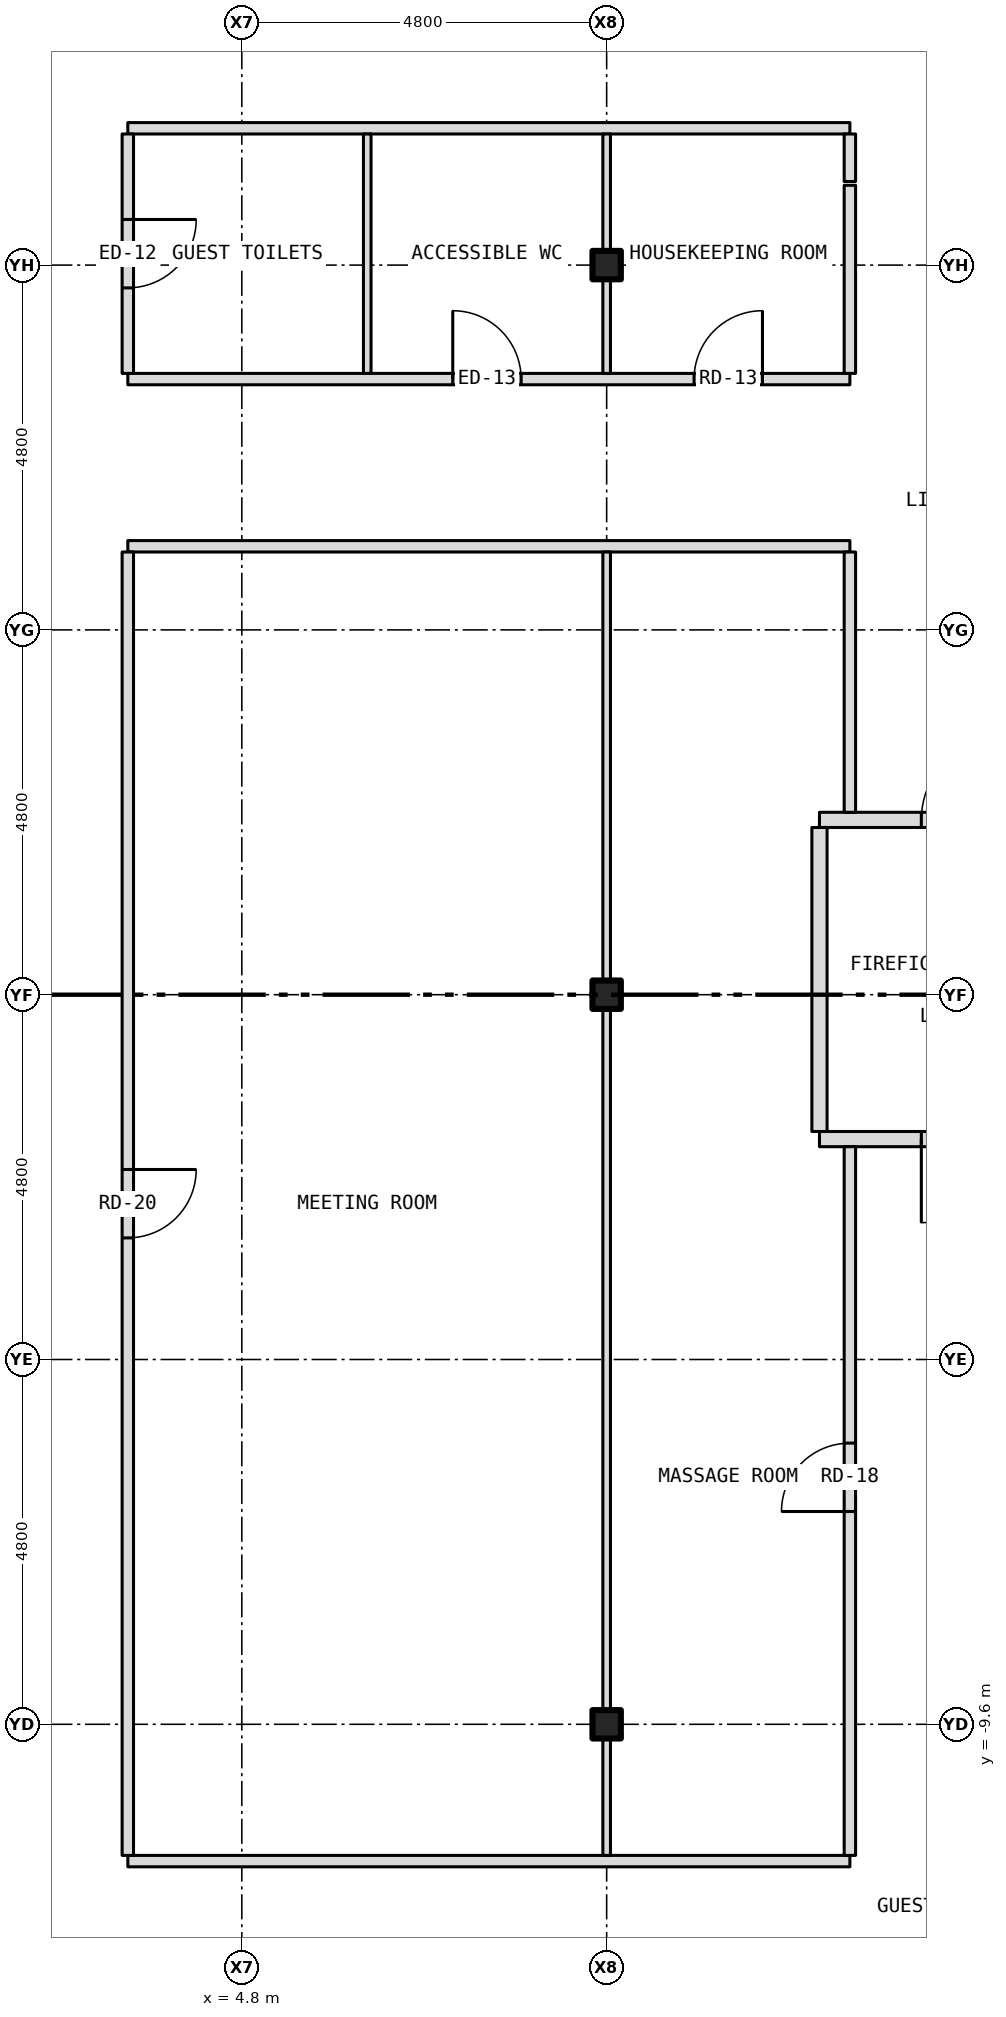
"""IFC4 building model, lengths in metres.
Left out: names, types, materials, properties, quantities, classifications, styles, units other than length and angle.
Written with IfcOpenShell. Run it as: python <this file> out.ifc"""

import sys

from ifc_helpers import new_model, si_unit, direction, frame, frame_2d, origin, origin_2d, place, context, subcontext, project, spatial, rectangle, i_section, extrude, element, fill, save


model = new_model("IFC4")
c1 = context("Model", 3, precision=1e-05, world=origin(), true_north=direction((0.0, 1.0)))
c2 = subcontext(c1, "Body", "Model", "MODEL_VIEW")
j1 = project(units=[si_unit("LENGTHUNIT", "METRE"), si_unit("PLANEANGLEUNIT", "RADIAN")], contexts=[c1])
p1 = place(None, origin())
s1 = spatial("IfcSite", under=j1, at=p1, CompositionType="ELEMENT")
p2 = place(p1, origin())
s2 = spatial("IfcBuilding", under=s1, at=p2, CompositionType="ELEMENT")
p3 = place(p2, frame((0.0, 0.0, 165.5)))
s3 = spatial("IfcBuildingStorey", under=s2, at=p3, CompositionType="ELEMENT", Elevation=165.5)
for number, where, z_axis, x_axis in (
    (1, (9.6, -9.6, -0.15), (0.0, 0.0, 1.0), (1.0, 0.0, 0.0)),
    (2, (9.6, 0.0, -0.15), (0.0, 0.0, 1.0), (1.0, 0.0, 0.0)),
    (3, (9.6, 9.6, -0.15), (0.0, 0.0, 1.0), (1.0, 0.0, 0.0)),
):
    element("IfcColumn", number, at=place(p3, frame(where, z_axis=z_axis, x_axis=x_axis)), inside=s3, PredefinedType="COLUMN", context=c2, shape_type="SweptSolid", body=[
        extrude(i_section(OverallWidth=0.373, OverallDepth=0.373, WebThickness=0.016, FlangeThickness=0.026, at=origin_2d()), origin(), (0.0, 0.0, 1.0), 3.5),
    ])
p4 = place(p3, frame((3.3, -11.4, 0.0), z_axis=(0.0, 0.0, 1.0), x_axis=(1.0, 0.0, 0.0)))
e4 = element("IfcWall", 4, at=p4, inside=s3, PredefinedType="PARTITIONING", context=c2, shape_type="SweptSolid", body=[
    extrude(rectangle(XDim=9.5, YDim=0.15, at=frame_2d((4.75, 0.0))), origin(), (0.0, 0.0, 1.0), 3.35),
])
p5 = place(p3, frame((12.4, -1.9, 0.0), z_axis=(0.0, 0.0, 1.0), x_axis=(1.0, 0.0, 0.0)))
e5 = element("IfcWall", 5, at=p5, inside=s3, PredefinedType="PARTITIONING", context=c2, shape_type="SweptSolid", body=[
    extrude(rectangle(XDim=3.28, YDim=0.2, at=frame_2d((1.64, 0.0))), origin(), (0.0, 0.0, 1.0), 3.35),
])
p6 = place(p5, frame((1.34, 0.0, 0.0)))
e6 = element("IfcOpeningElement", 6, at=p6, cuts=e5, PredefinedType="OPENING", context=c2, shape_type="SweptSolid", body=[
    extrude(rectangle(XDim=1.1, YDim=2.1, at=frame_2d((0.55, 1.05))), frame((0.0, 0.112, 0.0), z_axis=(0.0, -1.0, 0.0), x_axis=(1.0, 0.0, 0.0)), (0.0, 0.0, 1.0), 0.224),
])
p7 = place(p3, frame((12.4, 2.3, 0.0), z_axis=(0.0, 0.0, 1.0), x_axis=(1.0, 0.0, 0.0)))
e7 = element("IfcWall", 7, at=p7, inside=s3, PredefinedType="PARTITIONING", context=c2, shape_type="SweptSolid", body=[
    extrude(rectangle(XDim=3.28, YDim=0.2, at=frame_2d((1.64, 0.0))), origin(), (0.0, 0.0, 1.0), 3.35),
])
p8 = place(p7, frame((1.34, 0.0, 0.0)))
e8 = element("IfcOpeningElement", 8, at=p8, cuts=e7, PredefinedType="OPENING", context=c2, shape_type="SweptSolid", body=[
    extrude(rectangle(XDim=1.1, YDim=2.1, at=frame_2d((0.55, 1.05))), frame((0.0, 0.112, 0.0), z_axis=(0.0, -1.0, 0.0), x_axis=(1.0, 0.0, 0.0)), (0.0, 0.0, 1.0), 0.224),
])
p9 = place(p3, frame((3.3, 5.9, 0.0), z_axis=(0.0, 0.0, 1.0), x_axis=(1.0, 0.0, 0.0)))
e9 = element("IfcWall", 9, at=p9, inside=s3, PredefinedType="PARTITIONING", context=c2, shape_type="SweptSolid", body=[
    extrude(rectangle(XDim=9.5, YDim=0.15, at=frame_2d((4.75, 0.0))), origin(), (0.0, 0.0, 1.0), 3.35),
])
p10 = place(p3, frame((3.3, 8.1, 0.0), z_axis=(0.0, 0.0, 1.0), x_axis=(1.0, 0.0, 0.0)))
e10 = element("IfcWall", 10, at=p10, inside=s3, PredefinedType="PARTITIONING", context=c2, shape_type="SweptSolid", body=[
    extrude(rectangle(XDim=9.5, YDim=0.15, at=frame_2d((4.75, 0.0))), origin(), (0.0, 0.0, 1.0), 3.35),
])
p11 = place(p10, frame((7.45, 0.0, 0.0)))
e11 = element("IfcOpeningElement", 11, at=p11, cuts=e10, PredefinedType="OPENING", context=c2, shape_type="SweptSolid", body=[
    extrude(rectangle(XDim=0.9, YDim=2.1, at=frame_2d((0.45, 1.05))), frame((0.0, 0.087, 0.0), z_axis=(0.0, -1.0, 0.0), x_axis=(1.0, 0.0, 0.0)), (0.0, 0.0, 1.0), 0.174),
])
p12 = place(p10, frame((4.275, 0.0, 0.0)))
e12 = element("IfcOpeningElement", 12, at=p12, cuts=e10, PredefinedType="OPENING", context=c2, shape_type="SweptSolid", body=[
    extrude(rectangle(XDim=0.9, YDim=2.1, at=frame_2d((0.45, 1.05))), frame((0.0, 0.087, 0.0), z_axis=(0.0, -1.0, 0.0), x_axis=(1.0, 0.0, 0.0)), (0.0, 0.0, 1.0), 0.174),
])
p13 = place(p3, frame((3.3, 11.4, 0.0), z_axis=(0.0, 0.0, 1.0), x_axis=(1.0, 0.0, 0.0)))
e13 = element("IfcWall", 13, at=p13, inside=s3, PredefinedType="PARTITIONING", context=c2, shape_type="SweptSolid", body=[
    extrude(rectangle(XDim=9.5, YDim=0.15, at=frame_2d((4.75, 0.0))), origin(), (0.0, 0.0, 1.0), 3.35),
])
p14 = place(p3, frame((3.3, -11.325, 0.0), z_axis=(0.0, 0.0, 1.0), x_axis=(0.0, 1.0, 0.0)))
e14 = element("IfcWall", 14, at=p14, inside=s3, PredefinedType="PARTITIONING", context=c2, shape_type="SweptSolid", body=[
    extrude(rectangle(XDim=17.15, YDim=0.15, at=frame_2d((8.575, 0.0))), origin(), (0.0, 0.0, 1.0), 3.35),
])
p15 = place(p14, frame((8.125, 0.0, 0.0)))
e15 = element("IfcOpeningElement", 15, at=p15, cuts=e14, PredefinedType="OPENING", context=c2, shape_type="SweptSolid", body=[
    extrude(rectangle(XDim=0.9, YDim=2.1, at=frame_2d((0.45, 1.05))), frame((0.0, 0.087, 0.0), z_axis=(0.0, -1.0, 0.0), x_axis=(1.0, 0.0, 0.0)), (0.0, 0.0, 1.0), 0.174),
])
p16 = place(p3, frame((3.3, 8.175, 0.0), z_axis=(0.0, 0.0, 1.0), x_axis=(0.0, 1.0, 0.0)))
e16 = element("IfcWall", 16, at=p16, inside=s3, PredefinedType="PARTITIONING", context=c2, shape_type="SweptSolid", body=[
    extrude(rectangle(XDim=3.15, YDim=0.15, at=frame_2d((1.575, 0.0))), origin(), (0.0, 0.0, 1.0), 3.35),
])
p17 = place(p16, frame((1.125, 0.0, 0.0)))
e17 = element("IfcOpeningElement", 17, at=p17, cuts=e16, PredefinedType="OPENING", context=c2, shape_type="SweptSolid", body=[
    extrude(rectangle(XDim=0.9, YDim=2.1, at=frame_2d((0.45, 1.05))), frame((0.0, 0.087, 0.0), z_axis=(0.0, -1.0, 0.0), x_axis=(1.0, 0.0, 0.0)), (0.0, 0.0, 1.0), 0.174),
])
p18 = place(p3, frame((6.45, 8.175, 0.0), z_axis=(0.0, 0.0, 1.0), x_axis=(0.0, 1.0, 0.0)))
e18 = element("IfcWall", 18, at=p18, inside=s3, PredefinedType="PARTITIONING", context=c2, shape_type="SweptSolid", body=[
    extrude(rectangle(XDim=3.15, YDim=0.1, at=frame_2d((1.575, 0.0))), origin(), (0.0, 0.0, 1.0), 3.35),
])
p19 = place(p3, frame((9.6, -11.325, 0.0), z_axis=(0.0, 0.0, 1.0), x_axis=(0.0, 1.0, 0.0)))
e19 = element("IfcWall", 19, at=p19, inside=s3, PredefinedType="PARTITIONING", context=c2, shape_type="SweptSolid", body=[
    extrude(rectangle(XDim=1.538, YDim=0.1, at=frame_2d((0.769, 0.0))), origin(), (0.0, 0.0, 1.0), 2.728),
])
p20 = place(p3, frame((9.6, -9.787, 0.0), z_axis=(0.0, 0.0, 1.0), x_axis=(0.0, 1.0, 0.0)))
e20 = element("IfcWall", 20, at=p20, inside=s3, PredefinedType="PARTITIONING", context=c2, shape_type="SweptSolid", body=[
    extrude(rectangle(XDim=0.374, YDim=0.1, at=frame_2d((0.187, 0.0))), origin(), (0.0, 0.0, 1.0), 3.35),
])
p21 = place(p3, frame((9.6, -9.413, 0.0), z_axis=(0.0, 0.0, 1.0), x_axis=(0.0, 1.0, 0.0)))
e21 = element("IfcWall", 21, at=p21, inside=s3, PredefinedType="PARTITIONING", context=c2, shape_type="SweptSolid", body=[
    extrude(rectangle(XDim=9.226, YDim=0.1, at=frame_2d((4.613, 0.0))), origin(), (0.0, 0.0, 1.0), 2.728),
])
p22 = place(p3, frame((9.6, -0.187, 0.0), z_axis=(0.0, 0.0, 1.0), x_axis=(0.0, 1.0, 0.0)))
e22 = element("IfcWall", 22, at=p22, inside=s3, PredefinedType="PARTITIONING", context=c2, shape_type="SweptSolid", body=[
    extrude(rectangle(XDim=0.374, YDim=0.1, at=frame_2d((0.187, 0.0))), origin(), (0.0, 0.0, 1.0), 3.35),
])
p23 = place(p3, frame((9.6, 0.187, 0.0), z_axis=(0.0, 0.0, 1.0), x_axis=(0.0, 1.0, 0.0)))
e23 = element("IfcWall", 23, at=p23, inside=s3, PredefinedType="PARTITIONING", context=c2, shape_type="SweptSolid", body=[
    extrude(rectangle(XDim=5.638, YDim=0.1, at=frame_2d((2.819, 0.0))), origin(), (0.0, 0.0, 1.0), 2.728),
])
p24 = place(p3, frame((9.6, 8.175, 0.0), z_axis=(0.0, 0.0, 1.0), x_axis=(0.0, 1.0, 0.0)))
e24 = element("IfcWall", 24, at=p24, inside=s3, PredefinedType="PARTITIONING", context=c2, shape_type="SweptSolid", body=[
    extrude(rectangle(XDim=1.238, YDim=0.1, at=frame_2d((0.619, 0.0))), origin(), (0.0, 0.0, 1.0), 2.728),
])
p25 = place(p3, frame((9.6, 9.413, 0.0), z_axis=(0.0, 0.0, 1.0), x_axis=(0.0, 1.0, 0.0)))
e25 = element("IfcWall", 25, at=p25, inside=s3, PredefinedType="PARTITIONING", context=c2, shape_type="SweptSolid", body=[
    extrude(rectangle(XDim=0.374, YDim=0.1, at=frame_2d((0.187, 0.0))), origin(), (0.0, 0.0, 1.0), 3.35),
])
p26 = place(p3, frame((9.6, 9.787, 0.0), z_axis=(0.0, 0.0, 1.0), x_axis=(0.0, 1.0, 0.0)))
e26 = element("IfcWall", 26, at=p26, inside=s3, PredefinedType="PARTITIONING", context=c2, shape_type="SweptSolid", body=[
    extrude(rectangle(XDim=1.538, YDim=0.1, at=frame_2d((0.769, 0.0))), origin(), (0.0, 0.0, 1.0), 2.728),
])
p27 = place(p3, frame((12.4, -1.8, 0.0), z_axis=(0.0, 0.0, 1.0), x_axis=(0.0, 1.0, 0.0)))
e27 = element("IfcWall", 27, at=p27, inside=s3, PredefinedType="PARTITIONING", context=c2, shape_type="SweptSolid", body=[
    extrude(rectangle(XDim=4.0, YDim=0.2, at=frame_2d((2.0, 0.0))), origin(), (0.0, 0.0, 1.0), 3.35),
])
p28 = place(p3, frame((12.8, -11.325, 0.0), z_axis=(0.0, 0.0, 1.0), x_axis=(0.0, 1.0, 0.0)))
e28 = element("IfcWall", 28, at=p28, inside=s3, PredefinedType="PARTITIONING", context=c2, shape_type="SweptSolid", body=[
    extrude(rectangle(XDim=9.325, YDim=0.15, at=frame_2d((4.663, 0.0))), origin(), (0.0, 0.0, 1.0), 3.35),
])
p29 = place(p28, frame((4.525, 0.0, 0.0)))
e29 = element("IfcOpeningElement", 29, at=p29, cuts=e28, PredefinedType="OPENING", context=c2, shape_type="SweptSolid", body=[
    extrude(rectangle(XDim=0.9, YDim=2.1, at=frame_2d((0.45, 1.05))), frame((0.0, 0.087, 0.0), z_axis=(0.0, -1.0, 0.0), x_axis=(1.0, 0.0, 0.0)), (0.0, 0.0, 1.0), 0.174),
])
p30 = place(p3, frame((12.8, 2.4, 0.0), z_axis=(0.0, 0.0, 1.0), x_axis=(0.0, 1.0, 0.0)))
e30 = element("IfcWall", 30, at=p30, inside=s3, PredefinedType="PARTITIONING", context=c2, shape_type="SweptSolid", body=[
    extrude(rectangle(XDim=3.425, YDim=0.15, at=frame_2d((1.712, 0.0))), origin(), (0.0, 0.0, 1.0), 3.35),
])
p31 = place(p3, frame((12.8, 8.175, 0.0), z_axis=(0.0, 0.0, 1.0), x_axis=(0.0, 1.0, 0.0)))
e31 = element("IfcWall", 31, at=p31, inside=s3, PredefinedType="PARTITIONING", context=c2, shape_type="SweptSolid", body=[
    extrude(rectangle(XDim=2.475, YDim=0.15, at=frame_2d((1.237, 0.0))), origin(), (0.0, 0.0, 1.0), 3.35),
])
p32 = place(p3, frame((12.8, 10.7, 0.0), z_axis=(0.0, 0.0, 1.0), x_axis=(0.0, 1.0, 0.0)))
e32 = element("IfcWall", 32, at=p32, inside=s3, PredefinedType="PARTITIONING", context=c2, shape_type="SweptSolid", body=[
    extrude(rectangle(XDim=0.625, YDim=0.15, at=frame_2d((0.312, 0.0))), origin(), (0.0, 0.0, 1.0), 3.35),
])
p33 = place(p8, origin())
e33 = element("IfcDoor", 33, at=p33, inside=s3, OperationType="SINGLE_SWING_RIGHT", PredefinedType="DOOR", context=c2, shape_type="SweptSolid", body=[
    extrude(rectangle(XDim=1.1, YDim=2.1, at=frame_2d((0.55, 1.05))), frame((0.0, 0.025, 0.0), z_axis=(0.0, -1.0, 0.0), x_axis=(1.0, 0.0, 0.0)), (0.0, 0.0, 1.0), 0.05),
])
fill(e8, e33)
p34 = place(p6, origin())
e34 = element("IfcDoor", 34, at=p34, inside=s3, OperationType="SINGLE_SWING_LEFT", PredefinedType="DOOR", context=c2, shape_type="SweptSolid", body=[
    extrude(rectangle(XDim=1.1, YDim=2.1, at=frame_2d((0.55, 1.05))), frame((0.0, 0.025, 0.0), z_axis=(0.0, -1.0, 0.0), x_axis=(1.0, 0.0, 0.0)), (0.0, 0.0, 1.0), 0.05),
])
fill(e6, e34)
p35 = place(p11, origin())
e35 = element("IfcDoor", 35, at=p35, inside=s3, OperationType="SINGLE_SWING_RIGHT", PredefinedType="DOOR", context=c2, shape_type="SweptSolid", body=[
    extrude(rectangle(XDim=0.9, YDim=2.1, at=frame_2d((0.45, 1.05))), frame((0.0, 0.025, 0.0), z_axis=(0.0, -1.0, 0.0), x_axis=(1.0, 0.0, 0.0)), (0.0, 0.0, 1.0), 0.05),
])
fill(e11, e35)
p36 = place(p17, origin())
e36 = element("IfcDoor", 36, at=p36, inside=s3, OperationType="SINGLE_SWING_RIGHT", PredefinedType="DOOR", context=c2, shape_type="SweptSolid", body=[
    extrude(rectangle(XDim=0.9, YDim=2.1, at=frame_2d((0.45, 1.05))), frame((0.0, 0.025, 0.0), z_axis=(0.0, -1.0, 0.0), x_axis=(1.0, 0.0, 0.0)), (0.0, 0.0, 1.0), 0.05),
])
fill(e17, e36)
p37 = place(p12, origin())
e37 = element("IfcDoor", 37, at=p37, inside=s3, OperationType="SINGLE_SWING_LEFT", PredefinedType="DOOR", context=c2, shape_type="SweptSolid", body=[
    extrude(rectangle(XDim=0.9, YDim=2.1, at=frame_2d((0.45, 1.05))), frame((0.0, 0.025, 0.0), z_axis=(0.0, -1.0, 0.0), x_axis=(1.0, 0.0, 0.0)), (0.0, 0.0, 1.0), 0.05),
])
fill(e12, e37)
p38 = place(p29, origin())
e38 = element("IfcDoor", 38, at=p38, inside=s3, OperationType="SINGLE_SWING_LEFT", PredefinedType="DOOR", context=c2, shape_type="SweptSolid", body=[
    extrude(rectangle(XDim=0.9, YDim=2.1, at=frame_2d((0.45, 1.05))), frame((0.0, 0.025, 0.0), z_axis=(0.0, -1.0, 0.0), x_axis=(1.0, 0.0, 0.0)), (0.0, 0.0, 1.0), 0.05),
])
fill(e29, e38)
p39 = place(p15, origin())
e39 = element("IfcDoor", 39, at=p39, inside=s3, OperationType="SINGLE_SWING_RIGHT", PredefinedType="DOOR", context=c2, shape_type="SweptSolid", body=[
    extrude(rectangle(XDim=0.9, YDim=2.1, at=frame_2d((0.45, 1.05))), frame((0.0, 0.025, 0.0), z_axis=(0.0, -1.0, 0.0), x_axis=(1.0, 0.0, 0.0)), (0.0, 0.0, 1.0), 0.05),
])
fill(e15, e39)
save(model, sys.argv[1])
